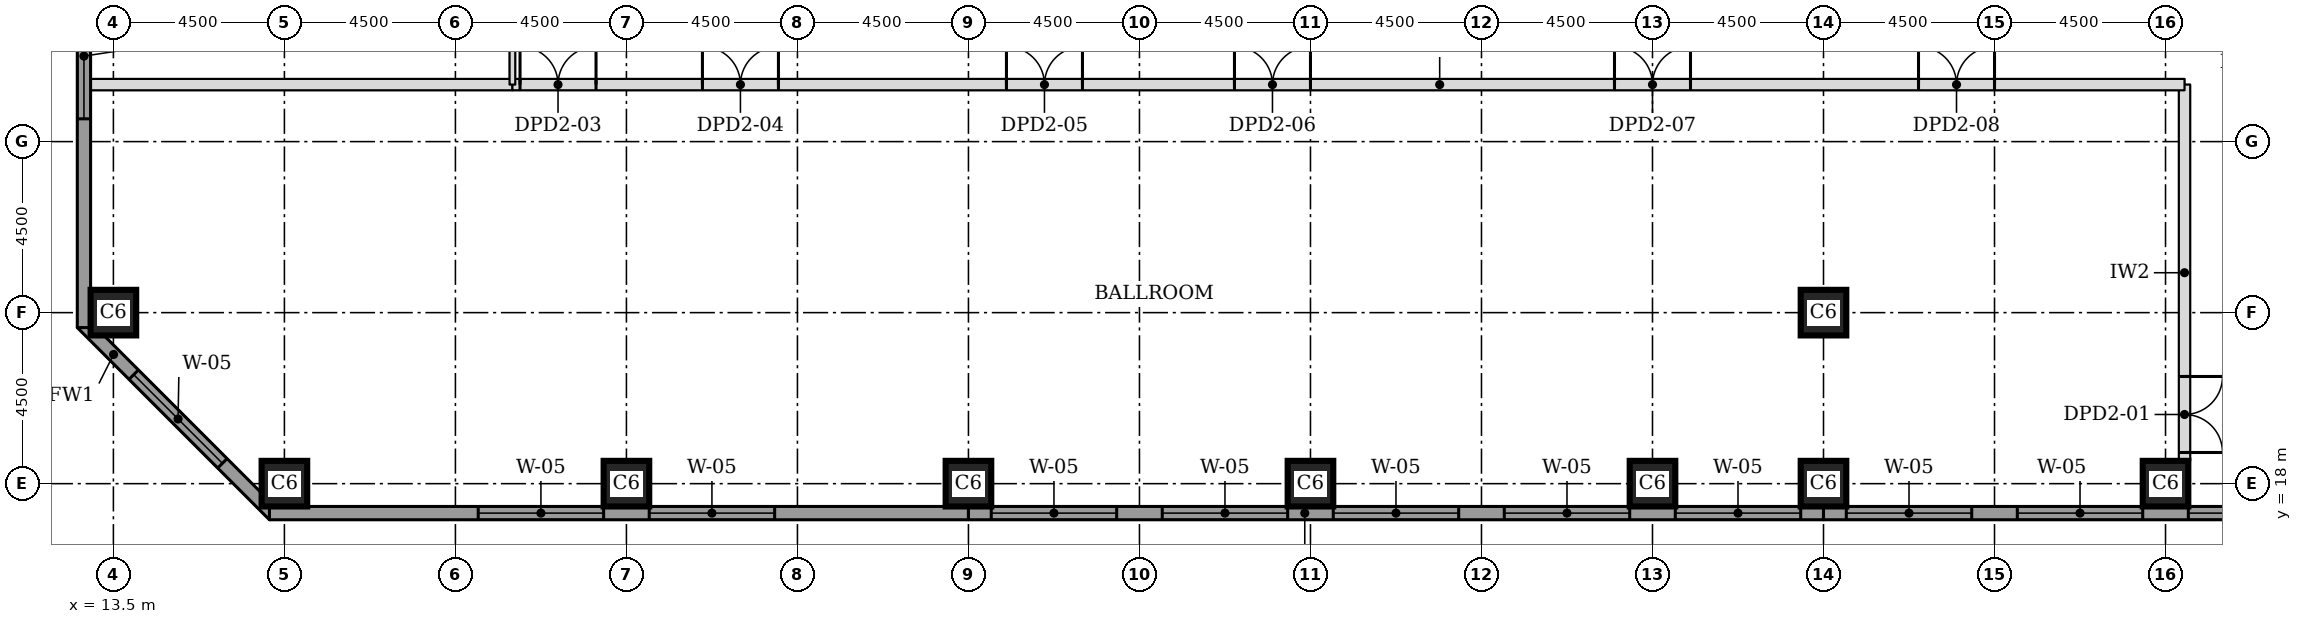
"""IFC4 building model, lengths in metres.
Left out: names, types, materials, properties, quantities, classifications, styles, units other than length and angle.
Written with IfcOpenShell. Run it as: python <this file> out.ifc"""

import sys

from ifc_helpers import new_model, si_unit, direction, frame, frame_2d, origin, origin_2d, place, context, subcontext, project, spatial, rectangle, extrude, element, fill, save


model = new_model("IFC4")
c1 = context("Model", 3, precision=1e-05, world=origin(), true_north=direction((0.0, 1.0)))
c2 = subcontext(c1, "Body", "Model", "MODEL_VIEW")
j1 = project(units=[si_unit("LENGTHUNIT", "METRE"), si_unit("PLANEANGLEUNIT", "RADIAN")], contexts=[c1])
p1 = place(None, origin())
s1 = spatial("IfcSite", under=j1, at=p1, CompositionType="ELEMENT")
p2 = place(p1, origin())
s2 = spatial("IfcBuilding", under=s1, at=p2, CompositionType="ELEMENT")
p3 = place(p2, frame((0.0, 0.0, 13.5)))
s3 = spatial("IfcBuildingStorey", under=s2, at=p3, CompositionType="ELEMENT", Elevation=13.5)
for number, where, z_axis, x_axis in (
    (1, (18.0, 18.0, 0.0), (0.0, 0.0, 1.0), (1.0, 0.0, 0.0)),
    (2, (27.0, 18.0, 0.0), (0.0, 0.0, 1.0), (1.0, 0.0, 0.0)),
    (3, (36.0, 18.0, 0.0), (0.0, 0.0, 1.0), (1.0, 0.0, 0.0)),
    (4, (45.0, 18.0, 0.0), (0.0, 0.0, 1.0), (1.0, 0.0, 0.0)),
    (5, (54.0, 18.0, 0.0), (0.0, 0.0, 1.0), (1.0, 0.0, 0.0)),
    (6, (58.5, 18.0, 0.0), (0.0, 0.0, 1.0), (1.0, 0.0, 0.0)),
    (7, (67.5, 18.0, 0.0), (0.0, 0.0, 1.0), (1.0, 0.0, 0.0)),
    (8, (13.5, 22.5, 0.0), (0.0, 0.0, 1.0), (1.0, 0.0, 0.0)),
    (9, (58.5, 22.5, 0.0), (0.0, 0.0, 1.0), (1.0, 0.0, 0.0)),
):
    element("IfcColumn", number, at=place(p3, frame(where, z_axis=z_axis, x_axis=x_axis)), inside=s3, PredefinedType="COLUMN", context=c2, shape_type="SweptSolid", body=[
        extrude(rectangle(XDim=1.2, YDim=1.2, at=origin_2d()), origin(), (0.0, 0.0, 1.0), 5.0),
    ])
p4 = place(p3, frame((12.674, 22.23, 0.0), z_axis=(0.0, 0.0, 1.0), x_axis=(0.707106781187, -0.707106781187, 0.0)))
e10 = element("IfcWall", 10, at=p4, inside=s3, PredefinedType="STANDARD", context=c2, shape_type="SweptSolid", body=[
    extrude(rectangle(XDim=7.151, YDim=0.35, at=frame_2d((3.576, 0.0))), origin(), (0.0, 0.0, 1.0), 4.755),
])
p5 = place(p4, frame((1.926, 0.0, 0.9)))
e11 = element("IfcOpeningElement", 11, at=p5, cuts=e10, PredefinedType="OPENING", context=c2, shape_type="SweptSolid", body=[
    extrude(rectangle(XDim=3.3, YDim=3.1, at=frame_2d((1.65, 1.55))), frame((0.0, 0.185, 0.0), z_axis=(0.0, -1.0, 0.0), x_axis=(1.0, 0.0, 0.0)), (0.0, 0.0, 1.0), 0.37),
])
p6 = place(p3, frame((17.606, 17.225, 0.0), z_axis=(0.0, 0.0, 1.0), x_axis=(1.0, 0.0, 0.0)))
e12 = element("IfcWall", 12, at=p6, inside=s3, PredefinedType="STANDARD", context=c2, shape_type="SweptSolid", body=[
    extrude(rectangle(XDim=18.394, YDim=0.35, at=frame_2d((9.197, 0.0))), origin(), (0.0, 0.0, 1.0), 4.755),
])
p7 = place(p6, frame((5.493, 0.0, 0.9)))
e13 = element("IfcOpeningElement", 13, at=p7, cuts=e12, PredefinedType="OPENING", context=c2, shape_type="SweptSolid", body=[
    extrude(rectangle(XDim=3.3, YDim=3.1, at=frame_2d((1.65, 1.55))), frame((0.0, 0.185, 0.0), z_axis=(0.0, -1.0, 0.0), x_axis=(1.0, 0.0, 0.0)), (0.0, 0.0, 1.0), 0.37),
])
p8 = place(p6, frame((9.993, 0.0, 0.9)))
e14 = element("IfcOpeningElement", 14, at=p8, cuts=e12, PredefinedType="OPENING", context=c2, shape_type="SweptSolid", body=[
    extrude(rectangle(XDim=3.3, YDim=3.1, at=frame_2d((1.65, 1.55))), frame((0.0, 0.185, 0.0), z_axis=(0.0, -1.0, 0.0), x_axis=(1.0, 0.0, 0.0)), (0.0, 0.0, 1.0), 0.37),
])
p9 = place(p3, frame((36.0, 17.225, 0.0), z_axis=(0.0, 0.0, 1.0), x_axis=(1.0, 0.0, 0.0)))
e15 = element("IfcWall", 15, at=p9, inside=s3, PredefinedType="STANDARD", context=c2, shape_type="SweptSolid", body=[
    extrude(rectangle(XDim=22.5, YDim=0.35, at=frame_2d((11.25, 0.0))), origin(), (0.0, 0.0, 1.0), 4.755),
])
p10 = place(p9, frame((0.6, 0.0, 0.9)))
e16 = element("IfcOpeningElement", 16, at=p10, cuts=e15, PredefinedType="OPENING", context=c2, shape_type="SweptSolid", body=[
    extrude(rectangle(XDim=3.3, YDim=3.1, at=frame_2d((1.65, 1.55))), frame((0.0, 0.185, 0.0), z_axis=(0.0, -1.0, 0.0), x_axis=(1.0, 0.0, 0.0)), (0.0, 0.0, 1.0), 0.37),
])
p11 = place(p9, frame((5.1, 0.0, 0.9)))
e17 = element("IfcOpeningElement", 17, at=p11, cuts=e15, PredefinedType="OPENING", context=c2, shape_type="SweptSolid", body=[
    extrude(rectangle(XDim=3.3, YDim=3.1, at=frame_2d((1.65, 1.55))), frame((0.0, 0.185, 0.0), z_axis=(0.0, -1.0, 0.0), x_axis=(1.0, 0.0, 0.0)), (0.0, 0.0, 1.0), 0.37),
])
p12 = place(p9, frame((9.6, 0.0, 0.9)))
e18 = element("IfcOpeningElement", 18, at=p12, cuts=e15, PredefinedType="OPENING", context=c2, shape_type="SweptSolid", body=[
    extrude(rectangle(XDim=3.3, YDim=3.1, at=frame_2d((1.65, 1.55))), frame((0.0, 0.185, 0.0), z_axis=(0.0, -1.0, 0.0), x_axis=(1.0, 0.0, 0.0)), (0.0, 0.0, 1.0), 0.37),
])
p13 = place(p9, frame((14.1, 0.0, 0.9)))
e19 = element("IfcOpeningElement", 19, at=p13, cuts=e15, PredefinedType="OPENING", context=c2, shape_type="SweptSolid", body=[
    extrude(rectangle(XDim=3.3, YDim=3.1, at=frame_2d((1.65, 1.55))), frame((0.0, 0.185, 0.0), z_axis=(0.0, -1.0, 0.0), x_axis=(1.0, 0.0, 0.0)), (0.0, 0.0, 1.0), 0.37),
])
p14 = place(p9, frame((18.6, 0.0, 0.9)))
e20 = element("IfcOpeningElement", 20, at=p14, cuts=e15, PredefinedType="OPENING", context=c2, shape_type="SweptSolid", body=[
    extrude(rectangle(XDim=3.3, YDim=3.1, at=frame_2d((1.65, 1.55))), frame((0.0, 0.185, 0.0), z_axis=(0.0, -1.0, 0.0), x_axis=(1.0, 0.0, 0.0)), (0.0, 0.0, 1.0), 0.37),
])
p15 = place(p3, frame((58.5, 17.225, 0.0), z_axis=(0.0, 0.0, 1.0), x_axis=(1.0, 0.0, 0.0)))
e21 = element("IfcWall", 21, at=p15, inside=s3, PredefinedType="STANDARD", context=c2, shape_type="SweptSolid", body=[
    extrude(rectangle(XDim=18.394, YDim=0.35, at=frame_2d((9.197, 0.0))), origin(), (0.0, 0.0, 1.0), 4.675),
])
p16 = place(p15, frame((0.6, 0.0, 0.9)))
e22 = element("IfcOpeningElement", 22, at=p16, cuts=e21, PredefinedType="OPENING", context=c2, shape_type="SweptSolid", body=[
    extrude(rectangle(XDim=3.3, YDim=3.1, at=frame_2d((1.65, 1.55))), frame((0.0, 0.185, 0.0), z_axis=(0.0, -1.0, 0.0), x_axis=(1.0, 0.0, 0.0)), (0.0, 0.0, 1.0), 0.37),
])
p17 = place(p15, frame((5.1, 0.0, 0.9)))
e23 = element("IfcOpeningElement", 23, at=p17, cuts=e21, PredefinedType="OPENING", context=c2, shape_type="SweptSolid", body=[
    extrude(rectangle(XDim=3.3, YDim=3.1, at=frame_2d((1.65, 1.55))), frame((0.0, 0.185, 0.0), z_axis=(0.0, -1.0, 0.0), x_axis=(1.0, 0.0, 0.0)), (0.0, 0.0, 1.0), 0.37),
])
p18 = place(p15, frame((9.6, 0.0, 0.9)))
e24 = element("IfcOpeningElement", 24, at=p18, cuts=e21, PredefinedType="OPENING", context=c2, shape_type="SweptSolid", body=[
    extrude(rectangle(XDim=3.3, YDim=3.1, at=frame_2d((1.65, 1.55))), frame((0.0, 0.185, 0.0), z_axis=(0.0, -1.0, 0.0), x_axis=(1.0, 0.0, 0.0)), (0.0, 0.0, 1.0), 0.37),
])
p19 = place(p15, frame((14.1, 0.0, 0.9)))
e25 = element("IfcOpeningElement", 25, at=p19, cuts=e21, PredefinedType="OPENING", context=c2, shape_type="SweptSolid", body=[
    extrude(rectangle(XDim=3.3, YDim=3.1, at=frame_2d((1.65, 1.55))), frame((0.0, 0.185, 0.0), z_axis=(0.0, -1.0, 0.0), x_axis=(1.0, 0.0, 0.0)), (0.0, 0.0, 1.0), 0.37),
])
p20 = place(p3, frame((12.725, 40.5, 0.0), z_axis=(0.0, 0.0, 1.0), x_axis=(0.0, -1.0, 0.0)))
e26 = element("IfcWall", 26, at=p20, inside=s3, PredefinedType="STANDARD", context=c2, shape_type="SweptSolid", body=[
    extrude(rectangle(XDim=18.394, YDim=0.35, at=frame_2d((9.197, 0.0))), origin(), (0.0, 0.0, 1.0), 4.755),
])
p21 = place(p20, frame((5.1, 0.0, 0.9)))
e27 = element("IfcOpeningElement", 27, at=p21, cuts=e26, PredefinedType="OPENING", context=c2, shape_type="SweptSolid", body=[
    extrude(rectangle(XDim=3.3, YDim=3.1, at=frame_2d((1.65, 1.55))), frame((0.0, 0.185, 0.0), z_axis=(0.0, -1.0, 0.0), x_axis=(1.0, 0.0, 0.0)), (0.0, 0.0, 1.0), 0.37),
])
p22 = place(p20, frame((9.6, 0.0, 0.9)))
e28 = element("IfcOpeningElement", 28, at=p22, cuts=e26, PredefinedType="OPENING", context=c2, shape_type="SweptSolid", body=[
    extrude(rectangle(XDim=3.3, YDim=3.1, at=frame_2d((1.65, 1.55))), frame((0.0, 0.185, 0.0), z_axis=(0.0, -1.0, 0.0), x_axis=(1.0, 0.0, 0.0)), (0.0, 0.0, 1.0), 0.37),
])
p23 = place(p3, frame((68.0, 18.6, 0.0), z_axis=(0.0, 0.0, 1.0), x_axis=(0.0, 1.0, 0.0)))
e29 = element("IfcWall", 29, at=p23, inside=s3, PredefinedType="PARTITIONING", context=c2, shape_type="SweptSolid", body=[
    extrude(rectangle(XDim=9.9, YDim=0.3, at=frame_2d((4.95, 0.0))), origin(), (0.0, 0.0, 1.0), 4.78),
])
p24 = place(p23, frame((0.22, 0.0, 0.0)))
e30 = element("IfcOpeningElement", 30, at=p24, cuts=e29, PredefinedType="OPENING", context=c2, shape_type="SweptSolid", body=[
    extrude(rectangle(XDim=2.0, YDim=2.1, at=frame_2d((1.0, 1.05))), frame((0.0, 0.16, 0.0), z_axis=(0.0, -1.0, 0.0), x_axis=(1.0, 0.0, 0.0)), (0.0, 0.0, 1.0), 0.32),
])
p25 = place(p3, frame((12.9, 28.5, 0.0), z_axis=(0.0, 0.0, 1.0), x_axis=(1.0, 0.0, 0.0)))
e31 = element("IfcWall", 31, at=p25, inside=s3, PredefinedType="PARTITIONING", context=c2, shape_type="SweptSolid", body=[
    extrude(rectangle(XDim=11.1, YDim=0.3, at=frame_2d((5.55, 0.0))), origin(), (0.0, 0.0, 1.0), 4.78),
])
p26 = place(p3, frame((24.0, 28.5, 0.0), z_axis=(0.0, 0.0, 1.0), x_axis=(1.0, 0.0, 0.0)))
e32 = element("IfcWall", 32, at=p26, inside=s3, PredefinedType="PARTITIONING", context=c2, shape_type="SweptSolid", body=[
    extrude(rectangle(XDim=44.0, YDim=0.3, at=frame_2d((22.0, 0.0))), origin(), (0.0, 0.0, 1.0), 4.78),
])
p27 = place(p26, frame((0.2, 0.0, 0.0)))
e33 = element("IfcOpeningElement", 33, at=p27, cuts=e32, PredefinedType="OPENING", context=c2, shape_type="SweptSolid", body=[
    extrude(rectangle(XDim=2.0, YDim=2.1, at=frame_2d((1.0, 1.05))), frame((0.0, 0.16, 0.0), z_axis=(0.0, -1.0, 0.0), x_axis=(1.0, 0.0, 0.0)), (0.0, 0.0, 1.0), 0.32),
])
p28 = place(p26, frame((5.0, 0.0, 0.0)))
e34 = element("IfcOpeningElement", 34, at=p28, cuts=e32, PredefinedType="OPENING", context=c2, shape_type="SweptSolid", body=[
    extrude(rectangle(XDim=2.0, YDim=2.1, at=frame_2d((1.0, 1.05))), frame((0.0, 0.16, 0.0), z_axis=(0.0, -1.0, 0.0), x_axis=(1.0, 0.0, 0.0)), (0.0, 0.0, 1.0), 0.32),
])
p29 = place(p26, frame((13.0, 0.0, 0.0)))
e35 = element("IfcOpeningElement", 35, at=p29, cuts=e32, PredefinedType="OPENING", context=c2, shape_type="SweptSolid", body=[
    extrude(rectangle(XDim=2.0, YDim=2.1, at=frame_2d((1.0, 1.05))), frame((0.0, 0.16, 0.0), z_axis=(0.0, -1.0, 0.0), x_axis=(1.0, 0.0, 0.0)), (0.0, 0.0, 1.0), 0.32),
])
p30 = place(p26, frame((19.0, 0.0, 0.0)))
e36 = element("IfcOpeningElement", 36, at=p30, cuts=e32, PredefinedType="OPENING", context=c2, shape_type="SweptSolid", body=[
    extrude(rectangle(XDim=2.0, YDim=2.1, at=frame_2d((1.0, 1.05))), frame((0.0, 0.16, 0.0), z_axis=(0.0, -1.0, 0.0), x_axis=(1.0, 0.0, 0.0)), (0.0, 0.0, 1.0), 0.32),
])
p31 = place(p26, frame((37.0, 0.0, 0.0)))
e37 = element("IfcOpeningElement", 37, at=p31, cuts=e32, PredefinedType="OPENING", context=c2, shape_type="SweptSolid", body=[
    extrude(rectangle(XDim=2.0, YDim=2.1, at=frame_2d((1.0, 1.05))), frame((0.0, 0.16, 0.0), z_axis=(0.0, -1.0, 0.0), x_axis=(1.0, 0.0, 0.0)), (0.0, 0.0, 1.0), 0.32),
])
p32 = place(p26, frame((29.0, 0.0, 0.0)))
e38 = element("IfcOpeningElement", 38, at=p32, cuts=e32, PredefinedType="OPENING", context=c2, shape_type="SweptSolid", body=[
    extrude(rectangle(XDim=2.0, YDim=2.1, at=frame_2d((1.0, 1.05))), frame((0.0, 0.16, 0.0), z_axis=(0.0, -1.0, 0.0), x_axis=(1.0, 0.0, 0.0)), (0.0, 0.0, 1.0), 0.32),
])
p33 = place(p3, frame((24.0, 28.5, 0.0), z_axis=(0.0, 0.0, 1.0), x_axis=(0.0, 1.0, 0.0)))
e39 = element("IfcWall", 39, at=p33, inside=s3, PredefinedType="PARTITIONING", context=c2, shape_type="SweptSolid", body=[
    extrude(rectangle(XDim=12.0, YDim=0.15, at=frame_2d((6.0, 0.0))), origin(), (0.0, 0.0, 1.0), 4.78),
])
p34 = place(p33, frame((4.5, 0.0, 0.0)))
e40 = element("IfcOpeningElement", 40, at=p34, cuts=e39, PredefinedType="OPENING", context=c2, shape_type="SweptSolid", body=[
    extrude(rectangle(XDim=2.0, YDim=2.1, at=frame_2d((1.0, 1.05))), frame((0.0, 0.085, 0.0), z_axis=(0.0, -1.0, 0.0), x_axis=(1.0, 0.0, 0.0)), (0.0, 0.0, 1.0), 0.17),
])
p35 = place(p5, origin())
e41 = element("IfcWindow", 41, at=p35, inside=s3, PartitioningType="SINGLE_PANEL", PredefinedType="WINDOW", context=c2, shape_type="SweptSolid", body=[
    extrude(rectangle(XDim=3.3, YDim=3.1, at=frame_2d((1.65, 1.55))), frame((0.0, 0.085, 0.0), z_axis=(0.0, -1.0, 0.0), x_axis=(1.0, 0.0, 0.0)), (0.0, 0.0, 1.0), 0.06),
])
fill(e11, e41)
p36 = place(p7, origin())
e42 = element("IfcWindow", 42, at=p36, inside=s3, PartitioningType="SINGLE_PANEL", PredefinedType="WINDOW", context=c2, shape_type="SweptSolid", body=[
    extrude(rectangle(XDim=3.3, YDim=3.1, at=frame_2d((1.65, 1.55))), frame((0.0, 0.085, 0.0), z_axis=(0.0, -1.0, 0.0), x_axis=(1.0, 0.0, 0.0)), (0.0, 0.0, 1.0), 0.06),
])
fill(e13, e42)
p37 = place(p8, origin())
e43 = element("IfcWindow", 43, at=p37, inside=s3, PartitioningType="SINGLE_PANEL", PredefinedType="WINDOW", context=c2, shape_type="SweptSolid", body=[
    extrude(rectangle(XDim=3.3, YDim=3.1, at=frame_2d((1.65, 1.55))), frame((0.0, 0.085, 0.0), z_axis=(0.0, -1.0, 0.0), x_axis=(1.0, 0.0, 0.0)), (0.0, 0.0, 1.0), 0.06),
])
fill(e14, e43)
p38 = place(p10, origin())
e44 = element("IfcWindow", 44, at=p38, inside=s3, PartitioningType="SINGLE_PANEL", PredefinedType="WINDOW", context=c2, shape_type="SweptSolid", body=[
    extrude(rectangle(XDim=3.3, YDim=3.1, at=frame_2d((1.65, 1.55))), frame((0.0, 0.085, 0.0), z_axis=(0.0, -1.0, 0.0), x_axis=(1.0, 0.0, 0.0)), (0.0, 0.0, 1.0), 0.06),
])
fill(e16, e44)
p39 = place(p11, origin())
e45 = element("IfcWindow", 45, at=p39, inside=s3, PartitioningType="SINGLE_PANEL", PredefinedType="WINDOW", context=c2, shape_type="SweptSolid", body=[
    extrude(rectangle(XDim=3.3, YDim=3.1, at=frame_2d((1.65, 1.55))), frame((0.0, 0.085, 0.0), z_axis=(0.0, -1.0, 0.0), x_axis=(1.0, 0.0, 0.0)), (0.0, 0.0, 1.0), 0.06),
])
fill(e17, e45)
p40 = place(p12, origin())
e46 = element("IfcWindow", 46, at=p40, inside=s3, PartitioningType="SINGLE_PANEL", PredefinedType="WINDOW", context=c2, shape_type="SweptSolid", body=[
    extrude(rectangle(XDim=3.3, YDim=3.1, at=frame_2d((1.65, 1.55))), frame((0.0, 0.085, 0.0), z_axis=(0.0, -1.0, 0.0), x_axis=(1.0, 0.0, 0.0)), (0.0, 0.0, 1.0), 0.06),
])
fill(e18, e46)
p41 = place(p13, origin())
e47 = element("IfcWindow", 47, at=p41, inside=s3, PartitioningType="SINGLE_PANEL", PredefinedType="WINDOW", context=c2, shape_type="SweptSolid", body=[
    extrude(rectangle(XDim=3.3, YDim=3.1, at=frame_2d((1.65, 1.55))), frame((0.0, 0.085, 0.0), z_axis=(0.0, -1.0, 0.0), x_axis=(1.0, 0.0, 0.0)), (0.0, 0.0, 1.0), 0.06),
])
fill(e19, e47)
p42 = place(p14, origin())
e48 = element("IfcWindow", 48, at=p42, inside=s3, PartitioningType="SINGLE_PANEL", PredefinedType="WINDOW", context=c2, shape_type="SweptSolid", body=[
    extrude(rectangle(XDim=3.3, YDim=3.1, at=frame_2d((1.65, 1.55))), frame((0.0, 0.085, 0.0), z_axis=(0.0, -1.0, 0.0), x_axis=(1.0, 0.0, 0.0)), (0.0, 0.0, 1.0), 0.06),
])
fill(e20, e48)
p43 = place(p16, origin())
e49 = element("IfcWindow", 49, at=p43, inside=s3, PartitioningType="SINGLE_PANEL", PredefinedType="WINDOW", context=c2, shape_type="SweptSolid", body=[
    extrude(rectangle(XDim=3.3, YDim=3.1, at=frame_2d((1.65, 1.55))), frame((0.0, 0.085, 0.0), z_axis=(0.0, -1.0, 0.0), x_axis=(1.0, 0.0, 0.0)), (0.0, 0.0, 1.0), 0.06),
])
fill(e22, e49)
p44 = place(p17, origin())
e50 = element("IfcWindow", 50, at=p44, inside=s3, PartitioningType="SINGLE_PANEL", PredefinedType="WINDOW", context=c2, shape_type="SweptSolid", body=[
    extrude(rectangle(XDim=3.3, YDim=3.1, at=frame_2d((1.65, 1.55))), frame((0.0, 0.085, 0.0), z_axis=(0.0, -1.0, 0.0), x_axis=(1.0, 0.0, 0.0)), (0.0, 0.0, 1.0), 0.06),
])
fill(e23, e50)
p45 = place(p18, origin())
e51 = element("IfcWindow", 51, at=p45, inside=s3, PartitioningType="SINGLE_PANEL", PredefinedType="WINDOW", context=c2, shape_type="SweptSolid", body=[
    extrude(rectangle(XDim=3.3, YDim=3.1, at=frame_2d((1.65, 1.55))), frame((0.0, 0.085, 0.0), z_axis=(0.0, -1.0, 0.0), x_axis=(1.0, 0.0, 0.0)), (0.0, 0.0, 1.0), 0.06),
])
fill(e24, e51)
p46 = place(p22, origin())
e52 = element("IfcWindow", 52, at=p46, inside=s3, PartitioningType="SINGLE_PANEL", PredefinedType="WINDOW", context=c2, shape_type="SweptSolid", body=[
    extrude(rectangle(XDim=3.3, YDim=3.1, at=frame_2d((1.65, 1.55))), frame((0.0, 0.085, 0.0), z_axis=(0.0, -1.0, 0.0), x_axis=(1.0, 0.0, 0.0)), (0.0, 0.0, 1.0), 0.06),
])
fill(e28, e52)
p47 = place(p27, origin())
e53 = element("IfcDoor", 53, at=p47, inside=s3, OperationType="DOUBLE_DOOR_SINGLE_SWING", PredefinedType="DOOR", context=c2, shape_type="SweptSolid", body=[
    extrude(rectangle(XDim=2.0, YDim=2.1, at=frame_2d((1.0, 1.05))), frame((0.0, 0.025, 0.0), z_axis=(0.0, -1.0, 0.0), x_axis=(1.0, 0.0, 0.0)), (0.0, 0.0, 1.0), 0.05),
])
fill(e33, e53)
p48 = place(p28, origin())
e54 = element("IfcDoor", 54, at=p48, inside=s3, OperationType="DOUBLE_DOOR_SINGLE_SWING", PredefinedType="DOOR", context=c2, shape_type="SweptSolid", body=[
    extrude(rectangle(XDim=2.0, YDim=2.1, at=frame_2d((1.0, 1.05))), frame((0.0, 0.025, 0.0), z_axis=(0.0, -1.0, 0.0), x_axis=(1.0, 0.0, 0.0)), (0.0, 0.0, 1.0), 0.05),
])
fill(e34, e54)
p49 = place(p29, origin())
e55 = element("IfcDoor", 55, at=p49, inside=s3, OperationType="DOUBLE_DOOR_SINGLE_SWING", PredefinedType="DOOR", context=c2, shape_type="SweptSolid", body=[
    extrude(rectangle(XDim=2.0, YDim=2.1, at=frame_2d((1.0, 1.05))), frame((0.0, 0.025, 0.0), z_axis=(0.0, -1.0, 0.0), x_axis=(1.0, 0.0, 0.0)), (0.0, 0.0, 1.0), 0.05),
])
fill(e35, e55)
p50 = place(p30, origin())
e56 = element("IfcDoor", 56, at=p50, inside=s3, OperationType="DOUBLE_DOOR_SINGLE_SWING", PredefinedType="DOOR", context=c2, shape_type="SweptSolid", body=[
    extrude(rectangle(XDim=2.0, YDim=2.1, at=frame_2d((1.0, 1.05))), frame((0.0, 0.025, 0.0), z_axis=(0.0, -1.0, 0.0), x_axis=(1.0, 0.0, 0.0)), (0.0, 0.0, 1.0), 0.05),
])
fill(e36, e56)
p51 = place(p31, origin())
e57 = element("IfcDoor", 57, at=p51, inside=s3, OperationType="DOUBLE_DOOR_SINGLE_SWING", PredefinedType="DOOR", context=c2, shape_type="SweptSolid", body=[
    extrude(rectangle(XDim=2.0, YDim=2.1, at=frame_2d((1.0, 1.05))), frame((0.0, 0.025, 0.0), z_axis=(0.0, -1.0, 0.0), x_axis=(1.0, 0.0, 0.0)), (0.0, 0.0, 1.0), 0.05),
])
fill(e37, e57)
p52 = place(p32, origin())
e58 = element("IfcDoor", 58, at=p52, inside=s3, OperationType="DOUBLE_DOOR_SINGLE_SWING", PredefinedType="DOOR", context=c2, shape_type="SweptSolid", body=[
    extrude(rectangle(XDim=2.0, YDim=2.1, at=frame_2d((1.0, 1.05))), frame((0.0, 0.025, 0.0), z_axis=(0.0, -1.0, 0.0), x_axis=(1.0, 0.0, 0.0)), (0.0, 0.0, 1.0), 0.05),
])
fill(e38, e58)
p53 = place(p24, frame((2.0, 0.0, 0.0), z_axis=(0.0, 0.0, 1.0), x_axis=(-1.0, 0.0, 0.0)))
e59 = element("IfcDoor", 59, at=p53, inside=s3, OperationType="DOUBLE_DOOR_SINGLE_SWING", PredefinedType="DOOR", context=c2, shape_type="SweptSolid", body=[
    extrude(rectangle(XDim=2.0, YDim=2.1, at=frame_2d((1.0, 1.05))), frame((0.0, 0.025, 0.0), z_axis=(0.0, -1.0, 0.0), x_axis=(1.0, 0.0, 0.0)), (0.0, 0.0, 1.0), 0.05),
])
fill(e30, e59)
save(model, sys.argv[1])
